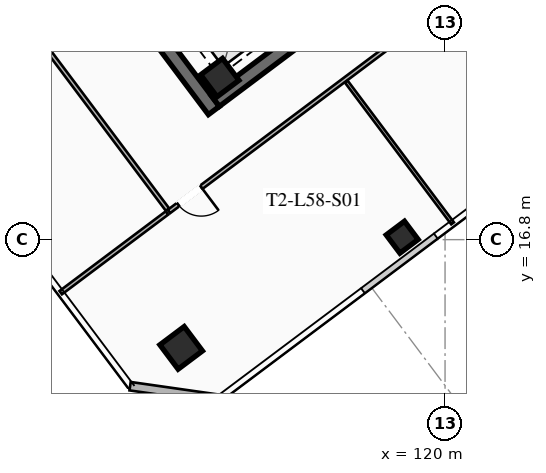
"""IFC4 building model, lengths in metres.
Left out: names, types, materials, properties, quantities, classifications, styles, units other than length and angle.
Written with IfcOpenShell. Run it as: python <this file> out.ifc"""

import sys

from ifc_helpers import new_model, si_unit, direction, frame, frame_2d, origin, origin_2d, place, context, subcontext, project, spatial, rectangle, hollow_rectangle, extrude, element, fill, save


model = new_model("IFC4")
c1 = context("Model", 3, precision=1e-05, world=origin(), true_north=direction((0.0, 1.0)))
c2 = subcontext(c1, "Body", "Model", "MODEL_VIEW")
j1 = project(units=[si_unit("LENGTHUNIT", "METRE"), si_unit("PLANEANGLEUNIT", "RADIAN")], contexts=[c1])
p1 = place(None, origin())
s1 = spatial("IfcSite", under=j1, at=p1, CompositionType="ELEMENT")
p2 = place(p1, origin())
s2 = spatial("IfcBuilding", under=s1, at=p2, CompositionType="ELEMENT")
p3 = place(p2, frame((0.0, 0.0, 214.85)))
s3 = spatial("IfcBuildingStorey", under=s2, at=p3, CompositionType="ELEMENT", Elevation=214.85)
p4 = place(p3, frame((112.396, 21.047, 0.0), z_axis=(0.0, 0.0, 1.0), x_axis=(-0.600005007985, 0.799996243986, 0.0)))
e1 = element("IfcWall", 1, at=p4, inside=s3, PredefinedType="SHEAR", context=c2, shape_type="SweptSolid", body=[
    extrude(rectangle(XDim=15.6, YDim=0.45, at=frame_2d((7.8, 0.0))), origin(), (0.0, 0.0, 1.0), 3.55),
])
p5 = place(p3, frame((124.649, 30.518, 0.0), z_axis=(0.0, 0.0, 1.0), x_axis=(-0.8, -0.6, 0.0)))
e2 = element("IfcWall", 2, at=p5, inside=s3, PredefinedType="SHEAR", context=c2, shape_type="SweptSolid", body=[
    extrude(rectangle(XDim=15.26, YDim=0.45, at=frame_2d((7.63, 0.0))), origin(), (0.0, 0.0, 1.0), 3.55),
])
p6 = place(p5, frame((9.33, 0.0, 0.0)))
e3 = element("IfcOpeningElement", 3, at=p6, cuts=e2, PredefinedType="OPENING", context=c2, shape_type="SweptSolid", body=[
    extrude(rectangle(XDim=1.25, YDim=2.25, at=frame_2d((0.625, 1.125))), frame((0.0, 0.235, 0.0), z_axis=(0.0, -1.0, 0.0), x_axis=(1.0, 0.0, 0.0)), (0.0, 0.0, 1.0), 0.47),
])
p7 = place(p5, frame((4.28, 0.0, 0.0)))
e4 = element("IfcOpeningElement", 4, at=p7, cuts=e2, PredefinedType="OPENING", context=c2, shape_type="SweptSolid", body=[
    extrude(rectangle(XDim=1.25, YDim=2.25, at=frame_2d((0.625, 1.125))), frame((0.0, 0.235, 0.0), z_axis=(0.0, -1.0, 0.0), x_axis=(1.0, 0.0, 0.0)), (0.0, 0.0, 1.0), 0.47),
])
p8 = place(p3, frame((112.59, 22.13, 0.0), z_axis=(0.0, 0.0, 1.0), x_axis=(0.799999996291, 0.600000004945, 0.0)))
e5 = element("IfcColumn", 5, at=p8, inside=s3, PredefinedType="COLUMN", context=c2, shape_type="SweptSolid", body=[
    extrude(hollow_rectangle(XDim=0.9, YDim=0.9, WallThickness=0.04, at=origin_2d()), origin(), (0.0, 0.0, 1.0), 3.37),
])
p9 = place(p3, frame((111.32, 13.24, 0.0), z_axis=(0.0, 0.0, 1.0), x_axis=(0.799999996291, 0.600000004945, 0.0)))
e6 = element("IfcColumn", 6, at=p9, inside=s3, PredefinedType="COLUMN", context=c2, shape_type="SweptSolid", body=[
    extrude(hollow_rectangle(XDim=1.0, YDim=1.0, WallThickness=0.04, at=origin_2d()), origin(), (0.0, 0.0, 1.0), 3.37),
])
p10 = place(p3, frame((118.59, 16.88, 0.0), z_axis=(0.0, 0.0, 1.0), x_axis=(0.799999996291, 0.600000004945, 0.0)))
e7 = element("IfcColumn", 7, at=p10, inside=s3, PredefinedType="COLUMN", context=c2, shape_type="SweptSolid", body=[
    extrude(hollow_rectangle(XDim=0.75, YDim=0.75, WallThickness=0.032, at=origin_2d()), origin(), (0.0, 0.0, 1.0), 3.37),
])
p11 = place(p3, frame((112.58, 11.56, 0.0), z_axis=(0.0, 0.0, 1.0), x_axis=(-0.989954425158, 0.14138683146, 0.0)))
e8 = element("IfcWall", 8, at=p11, inside=s3, PredefinedType="SOLIDWALL", context=c2, shape_type="SweptSolid", body=[
    extrude(rectangle(XDim=2.97, YDim=0.28, at=frame_2d((1.485, 0.0))), origin(), (0.0, 0.0, 1.0), 3.37),
])
p12 = place(p3, frame((123.262, 26.984, 0.0), z_axis=(0.0, 0.0, 1.0), x_axis=(-0.800005696094, -0.599992405132, 0.0)))
e9 = element("IfcWall", 9, at=p12, inside=s3, PredefinedType="PARTITIONING", context=c2, shape_type="SweptSolid", body=[
    extrude(rectangle(XDim=15.43, YDim=0.135, at=frame_2d((7.715, 0.0))), origin(), (0.0, 0.0, 1.0), 2.723),
])
p13 = place(p12, frame((14.1, 0.0, 0.0)))
e10 = element("IfcOpeningElement", 10, at=p13, cuts=e9, PredefinedType="OPENING", context=c2, shape_type="SweptSolid", body=[
    extrude(rectangle(XDim=0.95, YDim=2.05, at=frame_2d((0.475, 1.025))), frame((0.0, 0.077, 0.0), z_axis=(0.0, -1.0, 0.0), x_axis=(1.0, 0.0, 0.0)), (0.0, 0.0, 1.0), 0.155),
])
p14 = place(p12, frame((3.755, 0.0, 0.0)))
e11 = element("IfcOpeningElement", 11, at=p14, cuts=e9, PredefinedType="OPENING", context=c2, shape_type="SweptSolid", body=[
    extrude(rectangle(XDim=0.95, YDim=2.05, at=frame_2d((0.475, 1.025))), frame((0.0, 0.077, 0.0), z_axis=(0.0, -1.0, 0.0), x_axis=(1.0, 0.0, 0.0)), (0.0, 0.0, 1.0), 0.155),
])
p15 = place(p3, frame((120.248, 17.336, 0.0), z_axis=(0.0, 0.0, 1.0), x_axis=(-0.6, 0.8, 0.0)))
e12 = element("IfcWall", 12, at=p15, inside=s3, PredefinedType="PARTITIONING", context=c2, shape_type="SweptSolid", body=[
    extrude(rectangle(XDim=5.83, YDim=0.11, at=frame_2d((2.915, 0.0))), origin(), (0.0, 0.0, 1.0), 2.723),
])
p16 = place(p3, frame((110.87, 17.79, 0.0), z_axis=(0.0, 0.0, 1.0), x_axis=(-0.6, 0.8, 0.0)))
e13 = element("IfcWall", 13, at=p16, inside=s3, PredefinedType="PARTITIONING", context=c2, shape_type="SweptSolid", body=[
    extrude(rectangle(XDim=20.26, YDim=0.135, at=frame_2d((10.13, 0.0))), origin(), (0.0, 0.0, 1.0), 2.723),
])
p17 = place(p16, frame((19.01, 0.0, 0.0)))
e14 = element("IfcOpeningElement", 14, at=p17, cuts=e13, PredefinedType="OPENING", context=c2, shape_type="SweptSolid", body=[
    extrude(rectangle(XDim=0.95, YDim=2.05, at=frame_2d((0.475, 1.025))), frame((0.0, 0.077, 0.0), z_axis=(0.0, -1.0, 0.0), x_axis=(1.0, 0.0, 0.0)), (0.0, 0.0, 1.0), 0.155),
])
p18 = place(p3, frame((107.358, 15.056, 0.0), z_axis=(0.0, 0.0, 1.0), x_axis=(0.8, 0.6, 0.0)))
e15 = element("IfcWall", 15, at=p18, inside=s3, PredefinedType="PARTITIONING", context=c2, shape_type="SweptSolid", body=[
    extrude(rectangle(XDim=4.37, YDim=0.135, at=frame_2d((2.185, 0.0))), origin(), (0.0, 0.0, 1.0), 2.723),
])
p19 = place(p13, origin())
e16 = element("IfcDoor", 16, at=p19, inside=s3, OperationType="SINGLE_SWING_LEFT", PredefinedType="DOOR", context=c2, shape_type="SweptSolid", body=[
    extrude(rectangle(XDim=0.95, YDim=2.05, at=frame_2d((0.475, 1.025))), frame((0.0, 0.025, 0.0), z_axis=(0.0, -1.0, 0.0), x_axis=(1.0, 0.0, 0.0)), (0.0, 0.0, 1.0), 0.05),
])
fill(e10, e16)
save(model, sys.argv[1])
